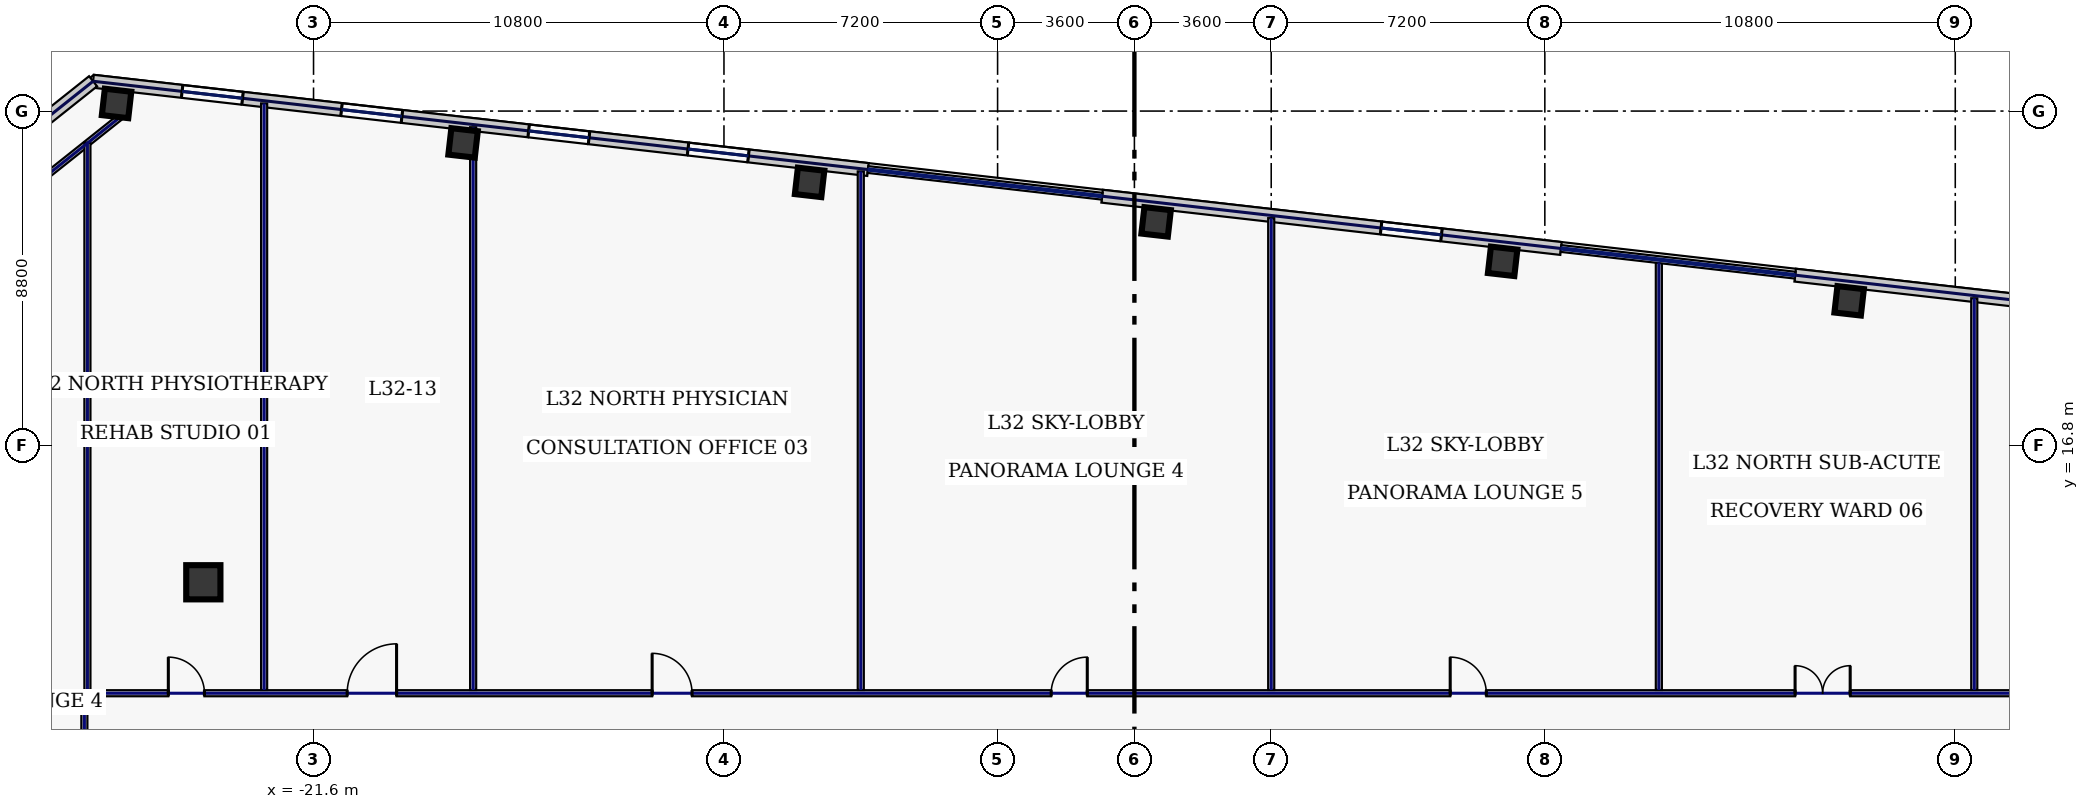
"""IFC4 building model, lengths in metres.
Left out: names, types, materials, properties, quantities, classifications, styles, units other than length and angle.
Written with IfcOpenShell. Run it as: python <this file> out.ifc"""

import sys

from ifc_helpers import new_model, si_unit, direction, frame, frame_2d, origin, origin_2d, place, context, subcontext, project, spatial, rectangle, hollow_rectangle, extrude, element, fill, save


model = new_model("IFC4")
c1 = context("Model", 3, precision=1e-05, world=origin(), true_north=direction((0.0, 1.0)))
c2 = subcontext(c1, "Body", "Model", "MODEL_VIEW")
j1 = project(units=[si_unit("LENGTHUNIT", "METRE"), si_unit("PLANEANGLEUNIT", "RADIAN")], contexts=[c1])
p1 = place(None, origin())
s1 = spatial("IfcSite", under=j1, at=p1, CompositionType="ELEMENT")
p2 = place(p1, origin())
s2 = spatial("IfcBuilding", under=s1, at=p2, CompositionType="ELEMENT")
p3 = place(p2, frame((0.0, 0.0, 141.4)))
s3 = spatial("IfcBuildingStorey", under=s2, at=p3, CompositionType="ELEMENT", Elevation=141.4)
p4 = place(p3, frame((-24.5, 13.2, 0.0), z_axis=(0.0, 0.0, 1.0), x_axis=(1.0, 0.0, 0.0)))
e1 = element("IfcColumn", 1, at=p4, inside=s3, PredefinedType="COLUMN", context=c2, shape_type="SweptSolid", body=[
    extrude(hollow_rectangle(XDim=0.9, YDim=0.9, WallThickness=0.04, at=origin_2d()), origin(), (0.0, 0.0, 1.0), 4.48),
])
for number, where, z_axis, x_axis in (
    (2, (18.808, 20.607, 0.0), (0.0, 0.0, 1.0), (0.994, -0.113, 0.0)),
    (3, (9.69, 21.646, 0.0), (0.0, 0.0, 1.0), (0.994, -0.113, 0.0)),
    (4, (0.571, 22.684, 0.0), (0.0, 0.0, 1.0), (0.994, -0.113, 0.0)),
    (5, (-8.547, 23.723, 0.0), (0.0, 0.0, 1.0), (0.994, -0.113, 0.0)),
    (6, (-17.665, 24.762, 0.0), (0.0, 0.0, 1.0), (0.994, -0.113, 0.0)),
    (7, (-26.783, 25.801, 0.0), (0.0, 0.0, 1.0), (0.994, -0.113, 0.0)),
):
    element("IfcColumn", number, at=place(p3, frame(where, z_axis=z_axis, x_axis=x_axis)), inside=s3, PredefinedType="COLUMN", context=c2, shape_type="SweptSolid", body=[
        extrude(hollow_rectangle(XDim=0.7, YDim=0.7, WallThickness=0.032, at=origin_2d()), origin(), (0.0, 0.0, 1.0), 4.48),
    ])
p5 = place(p3, frame((37.777, 18.958, 0.0), z_axis=(0.0, 0.0, 1.0), x_axis=(-0.993570538923, 0.113214770165, 0.0)))
e8 = element("IfcWall", 8, at=p5, inside=s3, PredefinedType="STANDARD", context=c2, shape_type="SweptSolid", body=[
    extrude(rectangle(XDim=20.523, YDim=0.34, at=frame_2d((10.261, 0.0))), origin(), (0.0, 0.0, 1.0), 4.48),
])
p6 = place(p5, frame((11.535, 0.0, 0.22)))
e9 = element("IfcOpeningElement", 9, at=p6, cuts=e8, PredefinedType="OPENING", context=c2, shape_type="SweptSolid", body=[
    extrude(rectangle(XDim=1.6, YDim=1.2, at=frame_2d((0.8, 0.6))), frame((0.0, 0.18, 0.0), z_axis=(0.0, -1.0, 0.0), x_axis=(1.0, 0.0, 0.0)), (0.0, 0.0, 1.0), 0.36),
])
p7 = place(p5, frame((6.586, 0.0, 0.22)))
e10 = element("IfcOpeningElement", 10, at=p7, cuts=e8, PredefinedType="OPENING", context=c2, shape_type="SweptSolid", body=[
    extrude(rectangle(XDim=1.6, YDim=1.2, at=frame_2d((0.8, 0.6))), frame((0.0, 0.18, 0.0), z_axis=(0.0, -1.0, 0.0), x_axis=(1.0, 0.0, 0.0)), (0.0, 0.0, 1.0), 0.36),
])
p8 = place(p5, frame((2.375, 0.0, 0.22)))
e11 = element("IfcOpeningElement", 11, at=p8, cuts=e8, PredefinedType="OPENING", context=c2, shape_type="SweptSolid", body=[
    extrude(rectangle(XDim=1.6, YDim=1.2, at=frame_2d((0.8, 0.6))), frame((0.0, 0.18, 0.0), z_axis=(0.0, -1.0, 0.0), x_axis=(1.0, 0.0, 0.0)), (0.0, 0.0, 1.0), 0.36),
])
p9 = place(p3, frame((11.226, 21.984, 0.0), z_axis=(0.0, 0.0, 1.0), x_axis=(-0.993571202571, 0.113208945853, 0.0)))
e12 = element("IfcWall", 12, at=p9, inside=s3, PredefinedType="STANDARD", context=c2, shape_type="SweptSolid", body=[
    extrude(rectangle(XDim=12.154, YDim=0.34, at=frame_2d((6.077, 0.0))), origin(), (0.0, 0.0, 1.0), 4.48),
])
p10 = place(p9, frame((3.167, 0.0, 0.22)))
e13 = element("IfcOpeningElement", 13, at=p10, cuts=e12, PredefinedType="OPENING", context=c2, shape_type="SweptSolid", body=[
    extrude(rectangle(XDim=1.6, YDim=1.2, at=frame_2d((0.8, 0.6))), frame((0.0, 0.18, 0.0), z_axis=(0.0, -1.0, 0.0), x_axis=(1.0, 0.0, 0.0)), (0.0, 0.0, 1.0), 0.36),
])
p11 = place(p3, frame((-7.01, 24.062, 0.0), z_axis=(0.0, 0.0, 1.0), x_axis=(-0.993571877006, 0.113203026563, 0.0)))
e14 = element("IfcWall", 14, at=p11, inside=s3, PredefinedType="STANDARD", context=c2, shape_type="SweptSolid", body=[
    extrude(rectangle(XDim=20.523, YDim=0.34, at=frame_2d((10.261, 0.0))), origin(), (0.0, 0.0, 1.0), 2.875),
])
p12 = place(p11, frame((16.565, 0.0, 0.22)))
e15 = element("IfcOpeningElement", 15, at=p12, cuts=e14, PredefinedType="OPENING", context=c2, shape_type="SweptSolid", body=[
    extrude(rectangle(XDim=1.6, YDim=1.2, at=frame_2d((0.8, 0.6))), frame((0.0, 0.18, 0.0), z_axis=(0.0, -1.0, 0.0), x_axis=(1.0, 0.0, 0.0)), (0.0, 0.0, 1.0), 0.36),
])
p13 = place(p11, frame((12.344, 0.0, 0.22)))
e16 = element("IfcOpeningElement", 16, at=p13, cuts=e14, PredefinedType="OPENING", context=c2, shape_type="SweptSolid", body=[
    extrude(rectangle(XDim=1.6, YDim=1.2, at=frame_2d((0.8, 0.6))), frame((0.0, 0.18, 0.0), z_axis=(0.0, -1.0, 0.0), x_axis=(1.0, 0.0, 0.0)), (0.0, 0.0, 1.0), 0.36),
])
p14 = place(p11, frame((7.388, 0.0, 0.22)))
e17 = element("IfcOpeningElement", 17, at=p14, cuts=e14, PredefinedType="OPENING", context=c2, shape_type="SweptSolid", body=[
    extrude(rectangle(XDim=1.6, YDim=1.2, at=frame_2d((0.8, 0.6))), frame((0.0, 0.18, 0.0), z_axis=(0.0, -1.0, 0.0), x_axis=(1.0, 0.0, 0.0)), (0.0, 0.0, 1.0), 0.36),
])
p15 = place(p11, frame((3.167, 0.0, 0.22)))
e18 = element("IfcOpeningElement", 18, at=p15, cuts=e14, PredefinedType="OPENING", context=c2, shape_type="SweptSolid", body=[
    extrude(rectangle(XDim=1.6, YDim=1.2, at=frame_2d((0.8, 0.6))), frame((0.0, 0.18, 0.0), z_axis=(0.0, -1.0, 0.0), x_axis=(1.0, 0.0, 0.0)), (0.0, 0.0, 1.0), 0.36),
])
p16 = place(p3, frame((-27.401, 26.385, 0.0), z_axis=(0.0, 0.0, 1.0), x_axis=(-0.78261359446, -0.622507800567, 0.0)))
e19 = element("IfcWall", 19, at=p16, inside=s3, PredefinedType="STANDARD", context=c2, shape_type="SweptSolid", body=[
    extrude(rectangle(XDim=7.114, YDim=0.34, at=frame_2d((3.557, 0.0))), origin(), (0.0, 0.0, 1.0), 4.48),
])
p17 = place(p3, frame((-26.571, 25.535, 0.0), z_axis=(0.0, 0.0, 1.0), x_axis=(-0.782617962887, -0.622502308564, 0.0)))
e20 = element("IfcWall", 20, at=p17, inside=s3, PredefinedType="PARTITIONING", context=c2, shape_type="SweptSolid", body=[
    extrude(rectangle(XDim=7.354, YDim=0.16, at=frame_2d((3.677, 0.0))), origin(), (0.0, 0.0, 1.0), 2.275),
])
p18 = place(p3, frame((-27.63, -10.015, 0.0), z_axis=(0.0, 0.0, 1.0), x_axis=(0.0, 1.0, 0.0)))
e21 = element("IfcWall", 21, at=p18, inside=s3, PredefinedType="PARTITIONING", context=c2, shape_type="SweptSolid", body=[
    extrude(rectangle(XDim=20.13, YDim=0.16, at=frame_2d((10.065, 0.0))), origin(), (0.0, 0.0, 1.0), 4.48),
])
p19 = place(p18, frame((2.169, 0.0, 0.0)))
e22 = element("IfcOpeningElement", 22, at=p19, cuts=e21, PredefinedType="OPENING", context=c2, shape_type="SweptSolid", body=[
    extrude(rectangle(XDim=0.95, YDim=2.2, at=frame_2d((0.475, 1.1))), frame((0.0, 0.09, 0.0), z_axis=(0.0, -1.0, 0.0), x_axis=(1.0, 0.0, 0.0)), (0.0, 0.0, 1.0), 0.18),
])
p20 = place(p18, frame((6.4, 0.0, 0.0)))
e23 = element("IfcOpeningElement", 23, at=p20, cuts=e21, PredefinedType="OPENING", context=c2, shape_type="SweptSolid", body=[
    extrude(rectangle(XDim=0.95, YDim=2.2, at=frame_2d((0.475, 1.1))), frame((0.0, 0.09, 0.0), z_axis=(0.0, -1.0, 0.0), x_axis=(1.0, 0.0, 0.0)), (0.0, 0.0, 1.0), 0.18),
])
p21 = place(p18, frame((11.9, 0.0, 0.0)))
e24 = element("IfcOpeningElement", 24, at=p21, cuts=e21, PredefinedType="OPENING", context=c2, shape_type="SweptSolid", body=[
    extrude(rectangle(XDim=0.95, YDim=2.2, at=frame_2d((0.475, 1.1))), frame((0.0, 0.09, 0.0), z_axis=(0.0, -1.0, 0.0), x_axis=(1.0, 0.0, 0.0)), (0.0, 0.0, 1.0), 0.18),
])
p22 = place(p18, frame((17.131, 0.0, 0.0)))
e25 = element("IfcOpeningElement", 25, at=p22, cuts=e21, PredefinedType="OPENING", context=c2, shape_type="SweptSolid", body=[
    extrude(rectangle(XDim=0.95, YDim=2.2, at=frame_2d((0.475, 1.1))), frame((0.0, 0.09, 0.0), z_axis=(0.0, -1.0, 0.0), x_axis=(1.0, 0.0, 0.0)), (0.0, 0.0, 1.0), 0.18),
])
p23 = place(p3, frame((-27.465, 10.28, 0.0), z_axis=(0.0, 0.0, 1.0), x_axis=(1.0, 0.0, 0.0)))
e26 = element("IfcWall", 26, at=p23, inside=s3, PredefinedType="PARTITIONING", context=c2, shape_type="SweptSolid", body=[
    extrude(rectangle(XDim=54.93, YDim=0.16, at=frame_2d((27.465, 0.0))), origin(), (0.0, 0.0, 1.0), 4.48),
])
p24 = place(p23, frame((2.044, 0.0, 0.0)))
e27 = element("IfcOpeningElement", 27, at=p24, cuts=e26, PredefinedType="OPENING", context=c2, shape_type="SweptSolid", body=[
    extrude(rectangle(XDim=0.95, YDim=2.2, at=frame_2d((0.475, 1.1))), frame((0.0, 0.09, 0.0), z_axis=(0.0, -1.0, 0.0), x_axis=(1.0, 0.0, 0.0)), (0.0, 0.0, 1.0), 0.18),
])
p25 = place(p23, frame((6.75, 0.0, 0.0)))
e28 = element("IfcOpeningElement", 28, at=p25, cuts=e26, PredefinedType="OPENING", context=c2, shape_type="SweptSolid", body=[
    extrude(rectangle(XDim=1.3, YDim=2.2, at=frame_2d((0.65, 1.1))), frame((0.0, 0.09, 0.0), z_axis=(0.0, -1.0, 0.0), x_axis=(1.0, 0.0, 0.0)), (0.0, 0.0, 1.0), 0.18),
])
p26 = place(p23, frame((14.775, 0.0, 0.0)))
e29 = element("IfcOpeningElement", 29, at=p26, cuts=e26, PredefinedType="OPENING", context=c2, shape_type="SweptSolid", body=[
    extrude(rectangle(XDim=1.05, YDim=2.2, at=frame_2d((0.525, 1.1))), frame((0.0, 0.09, 0.0), z_axis=(0.0, -1.0, 0.0), x_axis=(1.0, 0.0, 0.0)), (0.0, 0.0, 1.0), 0.18),
])
p27 = place(p23, frame((25.275, 0.0, 0.0)))
e30 = element("IfcOpeningElement", 30, at=p27, cuts=e26, PredefinedType="OPENING", context=c2, shape_type="SweptSolid", body=[
    extrude(rectangle(XDim=0.95, YDim=2.2, at=frame_2d((0.475, 1.1))), frame((0.0, 0.09, 0.0), z_axis=(0.0, -1.0, 0.0), x_axis=(1.0, 0.0, 0.0)), (0.0, 0.0, 1.0), 0.18),
])
p28 = place(p23, frame((35.775, 0.0, 0.0)))
e31 = element("IfcOpeningElement", 31, at=p28, cuts=e26, PredefinedType="OPENING", context=c2, shape_type="SweptSolid", body=[
    extrude(rectangle(XDim=0.95, YDim=2.2, at=frame_2d((0.475, 1.1))), frame((0.0, 0.09, 0.0), z_axis=(0.0, -1.0, 0.0), x_axis=(1.0, 0.0, 0.0)), (0.0, 0.0, 1.0), 0.18),
])
p29 = place(p23, frame((44.85, 0.0, 0.0)))
e32 = element("IfcOpeningElement", 32, at=p29, cuts=e26, PredefinedType="OPENING", context=c2, shape_type="SweptSolid", body=[
    extrude(rectangle(XDim=1.45, YDim=2.2, at=frame_2d((0.725, 1.1))), frame((0.0, 0.09, 0.0), z_axis=(0.0, -1.0, 0.0), x_axis=(1.0, 0.0, 0.0)), (0.0, 0.0, 1.0), 0.18),
])
p30 = place(p23, frame((51.706, 0.0, 0.0)))
e33 = element("IfcOpeningElement", 33, at=p30, cuts=e26, PredefinedType="OPENING", context=c2, shape_type="SweptSolid", body=[
    extrude(rectangle(XDim=1.15, YDim=2.2, at=frame_2d((0.575, 1.1))), frame((0.0, 0.09, 0.0), z_axis=(0.0, -1.0, 0.0), x_axis=(1.0, 0.0, 0.0)), (0.0, 0.0, 1.0), 0.18),
])
p31 = place(p3, frame((-27.55, 10.365, 0.0), z_axis=(0.0, 0.0, 1.0), x_axis=(0.0, 1.0, 0.0)))
e34 = element("IfcWall", 34, at=p31, inside=s3, PredefinedType="PARTITIONING", context=c2, shape_type="SweptSolid", body=[
    extrude(rectangle(XDim=14.409, YDim=0.16, at=frame_2d((7.204, 0.0))), origin(), (0.0, 0.0, 1.0), 2.275),
])
p32 = place(p3, frame((-22.9, 10.365, 0.0), z_axis=(0.0, 0.0, 1.0), x_axis=(0.0, 1.0, 0.0)))
e35 = element("IfcWall", 35, at=p32, inside=s3, PredefinedType="PARTITIONING", context=c2, shape_type="SweptSolid", body=[
    extrude(rectangle(XDim=15.437, YDim=0.16, at=frame_2d((7.718, 0.0))), origin(), (0.0, 0.0, 1.0), 4.48),
])
p33 = place(p3, frame((-17.4, 10.365, 0.0), z_axis=(0.0, 0.0, 1.0), x_axis=(0.0, 1.0, 0.0)))
e36 = element("IfcWall", 36, at=p33, inside=s3, PredefinedType="PARTITIONING", context=c2, shape_type="SweptSolid", body=[
    extrude(rectangle(XDim=14.81, YDim=0.16, at=frame_2d((7.405, 0.0))), origin(), (0.0, 0.0, 1.0), 4.48),
])
p34 = place(p3, frame((-7.2, 10.365, 0.0), z_axis=(0.0, 0.0, 1.0), x_axis=(0.0, 1.0, 0.0)))
e37 = element("IfcWall", 37, at=p34, inside=s3, PredefinedType="PARTITIONING", context=c2, shape_type="SweptSolid", body=[
    extrude(rectangle(XDim=13.648, YDim=0.16, at=frame_2d((6.824, 0.0))), origin(), (0.0, 0.0, 1.0), 4.48),
])
p35 = place(p3, frame((3.6, 10.365, 0.0), z_axis=(0.0, 0.0, 1.0), x_axis=(0.0, 1.0, 0.0)))
e38 = element("IfcWall", 38, at=p35, inside=s3, PredefinedType="PARTITIONING", context=c2, shape_type="SweptSolid", body=[
    extrude(rectangle(XDim=12.417, YDim=0.16, at=frame_2d((6.208, 0.0))), origin(), (0.0, 0.0, 1.0), 4.48),
])
p36 = place(p3, frame((13.8, 10.365, 0.0), z_axis=(0.0, 0.0, 1.0), x_axis=(0.0, 1.0, 0.0)))
e39 = element("IfcWall", 39, at=p36, inside=s3, PredefinedType="PARTITIONING", context=c2, shape_type="SweptSolid", body=[
    extrude(rectangle(XDim=11.255, YDim=0.16, at=frame_2d((5.627, 0.0))), origin(), (0.0, 0.0, 1.0), 2.275),
])
p37 = place(p3, frame((22.1, 10.365, 0.0), z_axis=(0.0, 0.0, 1.0), x_axis=(0.0, 1.0, 0.0)))
e40 = element("IfcWall", 40, at=p37, inside=s3, PredefinedType="PARTITIONING", context=c2, shape_type="SweptSolid", body=[
    extrude(rectangle(XDim=10.309, YDim=0.16, at=frame_2d((5.155, 0.0))), origin(), (0.0, 0.0, 1.0), 4.48),
])
p38 = place(p10, origin())
e41 = element("IfcWindow", 41, at=p38, inside=s3, PartitioningType="SINGLE_PANEL", PredefinedType="WINDOW", context=c2, shape_type="SweptSolid", body=[
    extrude(rectangle(XDim=1.6, YDim=1.2, at=frame_2d((0.8, 0.6))), frame((0.0, 0.03, 0.0), z_axis=(0.0, -1.0, 0.0), x_axis=(1.0, 0.0, 0.0)), (0.0, 0.0, 1.0), 0.06),
])
fill(e13, e41)
p39 = place(p12, origin())
e42 = element("IfcWindow", 42, at=p39, inside=s3, PartitioningType="SINGLE_PANEL", PredefinedType="WINDOW", context=c2, shape_type="SweptSolid", body=[
    extrude(rectangle(XDim=1.6, YDim=1.2, at=frame_2d((0.8, 0.6))), frame((0.0, 0.03, 0.0), z_axis=(0.0, -1.0, 0.0), x_axis=(1.0, 0.0, 0.0)), (0.0, 0.0, 1.0), 0.06),
])
fill(e15, e42)
p40 = place(p13, origin())
e43 = element("IfcWindow", 43, at=p40, inside=s3, PartitioningType="SINGLE_PANEL", PredefinedType="WINDOW", context=c2, shape_type="SweptSolid", body=[
    extrude(rectangle(XDim=1.6, YDim=1.2, at=frame_2d((0.8, 0.6))), frame((0.0, 0.03, 0.0), z_axis=(0.0, -1.0, 0.0), x_axis=(1.0, 0.0, 0.0)), (0.0, 0.0, 1.0), 0.06),
])
fill(e16, e43)
p41 = place(p14, origin())
e44 = element("IfcWindow", 44, at=p41, inside=s3, PartitioningType="SINGLE_PANEL", PredefinedType="WINDOW", context=c2, shape_type="SweptSolid", body=[
    extrude(rectangle(XDim=1.6, YDim=1.2, at=frame_2d((0.8, 0.6))), frame((0.0, 0.03, 0.0), z_axis=(0.0, -1.0, 0.0), x_axis=(1.0, 0.0, 0.0)), (0.0, 0.0, 1.0), 0.06),
])
fill(e17, e44)
p42 = place(p15, origin())
e45 = element("IfcWindow", 45, at=p42, inside=s3, PartitioningType="SINGLE_PANEL", PredefinedType="WINDOW", context=c2, shape_type="SweptSolid", body=[
    extrude(rectangle(XDim=1.6, YDim=1.2, at=frame_2d((0.8, 0.6))), frame((0.0, 0.03, 0.0), z_axis=(0.0, -1.0, 0.0), x_axis=(1.0, 0.0, 0.0)), (0.0, 0.0, 1.0), 0.06),
])
fill(e18, e45)
p43 = place(p24, origin())
e46 = element("IfcDoor", 46, at=p43, inside=s3, OperationType="SINGLE_SWING_LEFT", PredefinedType="DOOR", context=c2, shape_type="SweptSolid", body=[
    extrude(rectangle(XDim=0.95, YDim=2.2, at=frame_2d((0.475, 1.1))), frame((0.0, 0.025, 0.0), z_axis=(0.0, -1.0, 0.0), x_axis=(1.0, 0.0, 0.0)), (0.0, 0.0, 1.0), 0.05),
])
fill(e27, e46)
p44 = place(p25, origin())
e47 = element("IfcDoor", 47, at=p44, inside=s3, OperationType="SINGLE_SWING_RIGHT", PredefinedType="DOOR", context=c2, shape_type="SweptSolid", body=[
    extrude(rectangle(XDim=1.3, YDim=2.2, at=frame_2d((0.65, 1.1))), frame((0.0, 0.025, 0.0), z_axis=(0.0, -1.0, 0.0), x_axis=(1.0, 0.0, 0.0)), (0.0, 0.0, 1.0), 0.05),
])
fill(e28, e47)
p45 = place(p26, origin())
e48 = element("IfcDoor", 48, at=p45, inside=s3, OperationType="SINGLE_SWING_LEFT", PredefinedType="DOOR", context=c2, shape_type="SweptSolid", body=[
    extrude(rectangle(XDim=1.05, YDim=2.2, at=frame_2d((0.525, 1.1))), frame((0.0, 0.025, 0.0), z_axis=(0.0, -1.0, 0.0), x_axis=(1.0, 0.0, 0.0)), (0.0, 0.0, 1.0), 0.05),
])
fill(e29, e48)
p46 = place(p27, origin())
e49 = element("IfcDoor", 49, at=p46, inside=s3, OperationType="SINGLE_SWING_RIGHT", PredefinedType="DOOR", context=c2, shape_type="SweptSolid", body=[
    extrude(rectangle(XDim=0.95, YDim=2.2, at=frame_2d((0.475, 1.1))), frame((0.0, 0.025, 0.0), z_axis=(0.0, -1.0, 0.0), x_axis=(1.0, 0.0, 0.0)), (0.0, 0.0, 1.0), 0.05),
])
fill(e30, e49)
p47 = place(p28, origin())
e50 = element("IfcDoor", 50, at=p47, inside=s3, OperationType="SINGLE_SWING_LEFT", PredefinedType="DOOR", context=c2, shape_type="SweptSolid", body=[
    extrude(rectangle(XDim=0.95, YDim=2.2, at=frame_2d((0.475, 1.1))), frame((0.0, 0.025, 0.0), z_axis=(0.0, -1.0, 0.0), x_axis=(1.0, 0.0, 0.0)), (0.0, 0.0, 1.0), 0.05),
])
fill(e31, e50)
p48 = place(p29, origin())
e51 = element("IfcDoor", 51, at=p48, inside=s3, OperationType="DOUBLE_SWING_LEFT", PredefinedType="DOOR", context=c2, shape_type="SweptSolid", body=[
    extrude(rectangle(XDim=1.45, YDim=2.2, at=frame_2d((0.725, 1.1))), frame((0.0, 0.025, 0.0), z_axis=(0.0, -1.0, 0.0), x_axis=(1.0, 0.0, 0.0)), (0.0, 0.0, 1.0), 0.05),
])
fill(e32, e51)
save(model, sys.argv[1])
